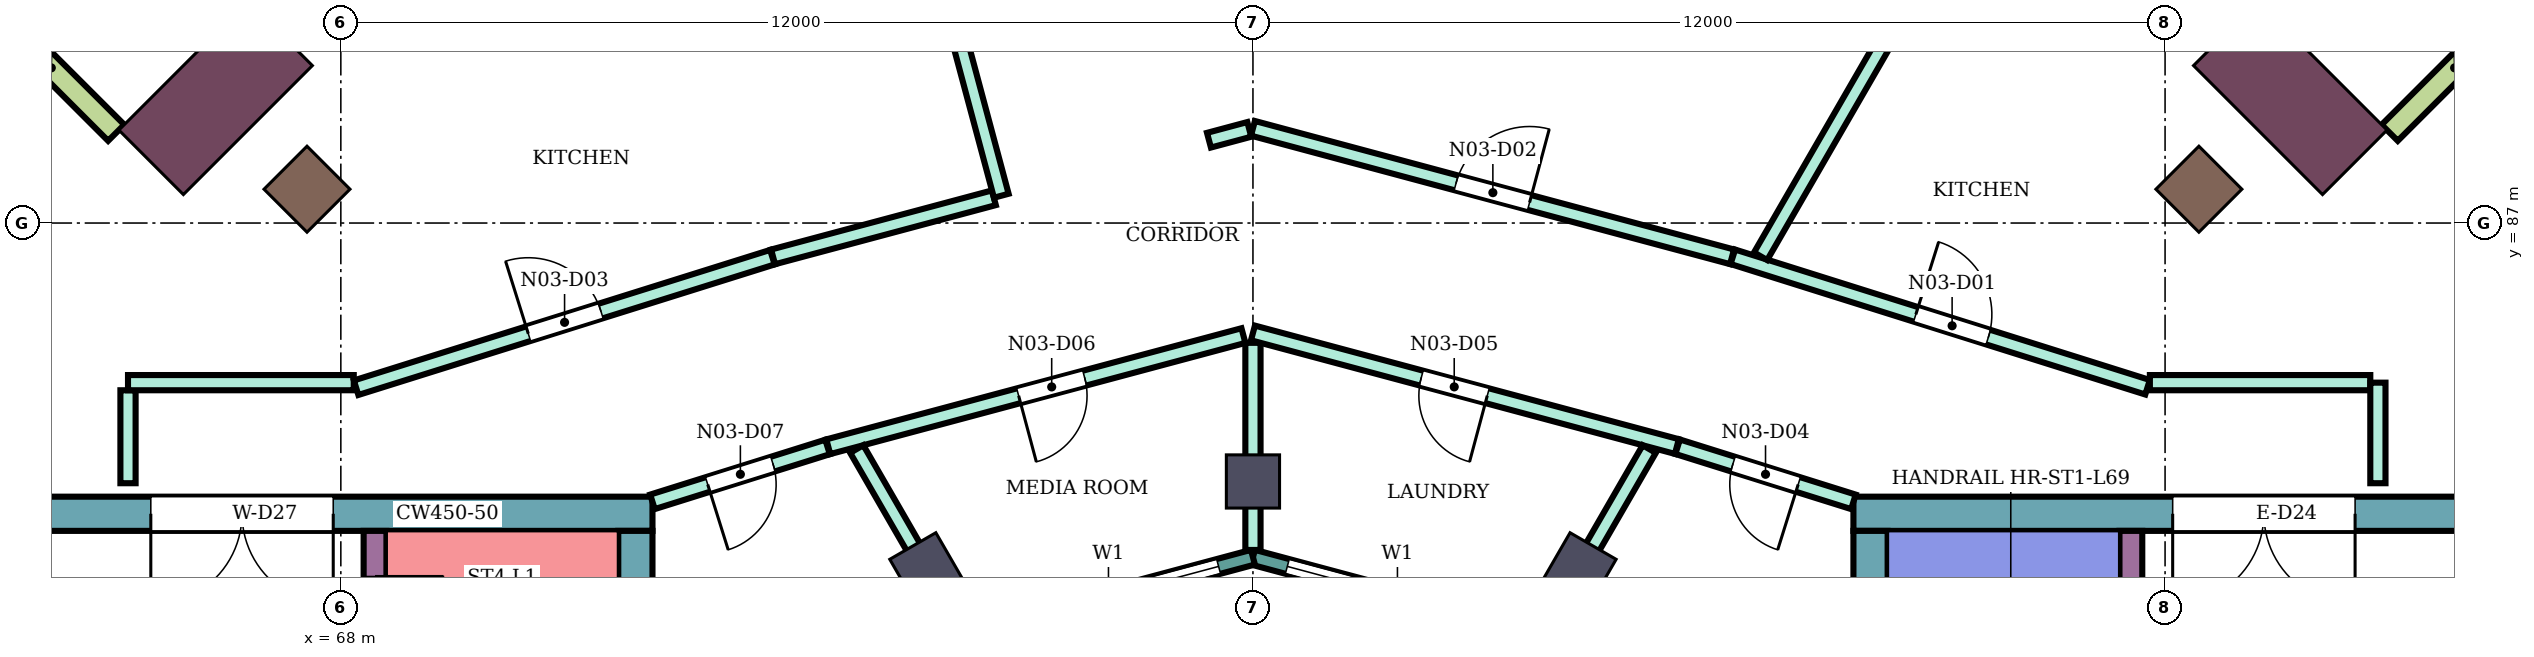
"""IFC4 building model, lengths in metres.
Left out: names, types, materials, properties, quantities, classifications, styles, units other than length and angle.
Written with IfcOpenShell. Run it as: python <this file> out.ifc"""

import sys

from ifc_helpers import new_model, si_unit, direction, frame, frame_2d, origin, origin_2d, place, context, subcontext, project, spatial, rectangle, extrude, element, fill, save


model = new_model("IFC4")
c1 = context("Model", 3, precision=1e-05, world=origin(), true_north=direction((0.0, 1.0)))
c2 = subcontext(c1, "Body", "Model", "MODEL_VIEW")
j1 = project(units=[si_unit("LENGTHUNIT", "METRE"), si_unit("PLANEANGLEUNIT", "RADIAN")], contexts=[c1])
p1 = place(None, origin())
s1 = spatial("IfcSite", under=j1, at=p1, CompositionType="ELEMENT")
p2 = place(p1, origin())
s2 = spatial("IfcBuilding", under=s1, at=p2, CompositionType="ELEMENT")
p3 = place(p2, frame((0.0, 0.0, 300.9)))
s3 = spatial("IfcBuildingStorey", under=s2, at=p3, CompositionType="ELEMENT", Elevation=300.9)
for number, where, z_axis, x_axis in (
    (1, (92.445, 87.445, 0.0), (0.0, 0.0, 1.0), (0.707, 0.707, 0.0)),
    (2, (67.555, 87.445, 0.0), (0.0, 0.0, 1.0), (-0.707, 0.707, 0.0)),
):
    element("IfcColumn", number, at=place(p3, frame(where, z_axis=z_axis, x_axis=x_axis)), inside=s3, PredefinedType="COLUMN", context=c2, shape_type="SweptSolid", body=[
        extrude(rectangle(XDim=0.8, YDim=0.8, at=origin_2d()), origin(), (0.0, 0.0, 1.0), 4.2),
    ])
for number, where, z_axis, x_axis in (
    (3, (84.3, 82.448, 0.0), (0.0, 0.0, 1.0), (0.5, 0.866, 0.0)),
    (4, (80.0, 83.6, 0.0), (0.0, 0.0, 1.0), (0.0, 1.0, 0.0)),
    (5, (75.7, 82.448, 0.0), (0.0, 0.0, 1.0), (-0.5, 0.866, 0.0)),
):
    element("IfcColumn", number, at=place(p3, frame(where, z_axis=z_axis, x_axis=x_axis)), inside=s3, PredefinedType="COLUMN", context=c2, shape_type="SweptSolid", body=[
        extrude(rectangle(XDim=0.7, YDim=0.7, at=origin_2d()), origin(), (0.0, 0.0, 1.0), 4.2),
    ])
for number, where, z_axis, x_axis in (
    (6, (93.647, 88.647, 0.0), (0.0, 0.0, 1.0), (0.707, 0.707, 0.0)),
    (7, (66.353, 88.647, 0.0), (0.0, 0.0, 1.0), (-0.707, 0.707, 0.0)),
):
    element("IfcColumn", number, at=place(p3, frame(where, z_axis=z_axis, x_axis=x_axis)), inside=s3, PredefinedType="COLUMN", context=c2, shape_type="SweptSolid", body=[
        extrude(rectangle(XDim=1.2, YDim=2.4, at=origin_2d()), origin(), (0.0, 0.0, 1.0), 4.2),
    ])
p4 = place(p3, frame((87.9, 83.175, 0.0), z_axis=(0.0, 0.0, 1.0), x_axis=(1.0, 0.0, 0.0)))
e8 = element("IfcWall", 8, at=p4, inside=s3, PredefinedType="SHEAR", context=c2, shape_type="SweptSolid", body=[
    extrude(rectangle(XDim=12.0, YDim=0.45, at=frame_2d((6.0, 0.0))), origin(), (0.0, 0.0, 1.0), 3.88),
])
p5 = place(p4, frame((4.2, 0.0, 0.0)))
e9 = element("IfcOpeningElement", 9, at=p5, cuts=e8, PredefinedType="OPENING", context=c2, shape_type="SweptSolid", body=[
    extrude(rectangle(XDim=2.4, YDim=2.4, at=frame_2d((1.2, 1.2))), frame((0.0, 0.235, 0.0), z_axis=(0.0, -1.0, 0.0), x_axis=(1.0, 0.0, 0.0)), (0.0, 0.0, 1.0), 0.47),
])
p6 = place(p3, frame((88.125, 75.0, 0.0), z_axis=(0.0, 0.0, 1.0), x_axis=(0.0, 1.0, 0.0)))
e10 = element("IfcWall", 10, at=p6, inside=s3, PredefinedType="SHEAR", context=c2, shape_type="SweptSolid", body=[
    extrude(rectangle(XDim=7.95, YDim=0.45, at=frame_2d((3.975, 0.0))), origin(), (0.0, 0.0, 1.0), 3.88),
])
p7 = place(p3, frame((91.55, 75.0, 0.0), z_axis=(0.0, 0.0, 1.0), x_axis=(0.0, 1.0, 0.0)))
e11 = element("IfcWall", 11, at=p7, inside=s3, PredefinedType="SHEAR", context=c2, shape_type="SweptSolid", body=[
    extrude(rectangle(XDim=7.95, YDim=0.3, at=frame_2d((3.975, 0.0))), origin(), (0.0, 0.0, 1.0), 3.88),
])
p8 = place(p7, frame((1.85, 0.0, 0.0)))
e12 = element("IfcOpeningElement", 12, at=p8, cuts=e11, PredefinedType="OPENING", context=c2, shape_type="SweptSolid", body=[
    extrude(rectangle(XDim=0.9, YDim=2.1, at=frame_2d((0.45, 1.05))), frame((0.0, 0.16, 0.0), z_axis=(0.0, -1.0, 0.0), x_axis=(1.0, 0.0, 0.0)), (0.0, 0.0, 1.0), 0.32),
])
p9 = place(p3, frame((72.1, 83.175, 0.0), z_axis=(0.0, 0.0, 1.0), x_axis=(-1.0, 0.0, 0.0)))
e13 = element("IfcWall", 13, at=p9, inside=s3, PredefinedType="SHEAR", context=c2, shape_type="SweptSolid", body=[
    extrude(rectangle(XDim=12.0, YDim=0.45, at=frame_2d((6.0, 0.0))), origin(), (0.0, 0.0, 1.0), 3.88),
])
p10 = place(p9, frame((4.2, 0.0, 0.0)))
e14 = element("IfcOpeningElement", 14, at=p10, cuts=e13, PredefinedType="OPENING", context=c2, shape_type="SweptSolid", body=[
    extrude(rectangle(XDim=2.4, YDim=2.4, at=frame_2d((1.2, 1.2))), frame((0.0, 0.235, 0.0), z_axis=(0.0, -1.0, 0.0), x_axis=(1.0, 0.0, 0.0)), (0.0, 0.0, 1.0), 0.47),
])
p11 = place(p3, frame((71.875, 82.95, 0.0), z_axis=(0.0, 0.0, 1.0), x_axis=(0.0, -1.0, 0.0)))
e15 = element("IfcWall", 15, at=p11, inside=s3, PredefinedType="SHEAR", context=c2, shape_type="SweptSolid", body=[
    extrude(rectangle(XDim=7.95, YDim=0.45, at=frame_2d((3.975, 0.0))), origin(), (0.0, 0.0, 1.0), 3.88),
])
p12 = place(p3, frame((68.45, 82.95, 0.0), z_axis=(0.0, 0.0, 1.0), x_axis=(0.0, -1.0, 0.0)))
e16 = element("IfcWall", 16, at=p12, inside=s3, PredefinedType="SHEAR", context=c2, shape_type="SweptSolid", body=[
    extrude(rectangle(XDim=7.95, YDim=0.3, at=frame_2d((3.975, 0.0))), origin(), (0.0, 0.0, 1.0), 3.88),
])
p13 = place(p12, frame((0.6, 0.0, 0.0)))
e17 = element("IfcOpeningElement", 17, at=p13, cuts=e16, PredefinedType="OPENING", context=c2, shape_type="SweptSolid", body=[
    extrude(rectangle(XDim=0.9, YDim=2.1, at=frame_2d((0.45, 1.05))), frame((0.0, 0.16, 0.0), z_axis=(0.0, -1.0, 0.0), x_axis=(1.0, 0.0, 0.0)), (0.0, 0.0, 1.0), 0.32),
])
for number, where, z_axis, x_axis in (
    (18, (94.955, 88.188, 0.0), (0.0, 0.0, 1.0), (0.707, 0.707, 0.0)),
    (19, (65.045, 88.188, 0.0), (0.0, 0.0, 1.0), (-0.707, 0.707, 0.0)),
):
    element("IfcWall", number, at=place(p3, frame(where, z_axis=z_axis, x_axis=x_axis)), inside=s3, PredefinedType="NOTDEFINED", context=c2, shape_type="SweptSolid", body=[
        extrude(rectangle(XDim=2.416, YDim=0.3, at=frame_2d((1.208, 0.0))), origin(), (0.0, 0.0, 1.0), 4.2),
    ])
p14 = place(p3, frame((83.802, 81.585, 0.0), z_axis=(0.0, 0.0, 1.0), x_axis=(-0.965933654434, 0.258789828301, 0.0)))
e20 = element("IfcWall", 20, at=p14, inside=s3, PredefinedType="NOTDEFINED", context=c2, shape_type="SweptSolid", body=[
    extrude(rectangle(XDim=3.936, YDim=0.2, at=frame_2d((1.968, 0.0))), origin(), (0.0, 0.0, 1.0), 4.2),
])
p15 = place(p14, frame((0.468, 0.0, 0.9)))
e21 = element("IfcOpeningElement", 21, at=p15, cuts=e20, PredefinedType="OPENING", context=c2, shape_type="SweptSolid", body=[
    extrude(rectangle(XDim=3.0, YDim=2.3, at=frame_2d((1.5, 1.15))), frame((0.0, 0.11, 0.0), z_axis=(0.0, -1.0, 0.0), x_axis=(1.0, 0.0, 0.0)), (0.0, 0.0, 1.0), 0.22),
])
p16 = place(p3, frame((80.0, 82.604, 0.0), z_axis=(0.0, 0.0, 1.0), x_axis=(-0.965933654434, -0.258789828301, 0.0)))
e22 = element("IfcWall", 22, at=p16, inside=s3, PredefinedType="NOTDEFINED", context=c2, shape_type="SweptSolid", body=[
    extrude(rectangle(XDim=3.936, YDim=0.2, at=frame_2d((1.968, 0.0))), origin(), (0.0, 0.0, 1.0), 4.2),
])
p17 = place(p16, frame((0.468, 0.0, 0.9)))
e23 = element("IfcOpeningElement", 23, at=p17, cuts=e22, PredefinedType="OPENING", context=c2, shape_type="SweptSolid", body=[
    extrude(rectangle(XDim=3.0, YDim=2.3, at=frame_2d((1.5, 1.15))), frame((0.0, 0.11, 0.0), z_axis=(0.0, -1.0, 0.0), x_axis=(1.0, 0.0, 0.0)), (0.0, 0.0, 1.0), 0.22),
])
p18 = place(p3, frame((65.2, 83.577, 0.0), z_axis=(0.0, 0.0, 1.0), x_axis=(0.0, 1.0, 0.0)))
e24 = element("IfcWall", 24, at=p18, inside=s3, PredefinedType="PARTITIONING", context=c2, shape_type="SweptSolid", body=[
    extrude(rectangle(XDim=1.223, YDim=0.2, at=frame_2d((0.612, 0.0))), origin(), (0.0, 0.0, 1.0), 3.75),
])
p19 = place(p3, frame((65.2, 84.9, 0.0), z_axis=(0.0, 0.0, 1.0), x_axis=(1.0, 0.0, 0.0)))
e25 = element("IfcWall", 25, at=p19, inside=s3, PredefinedType="PARTITIONING", context=c2, shape_type="SweptSolid", body=[
    extrude(rectangle(XDim=2.97, YDim=0.2, at=frame_2d((1.485, 0.0))), origin(), (0.0, 0.0, 1.0), 3.75),
])
p20 = place(p3, frame((68.201, 84.833, 0.0), z_axis=(0.0, 0.0, 1.0), x_axis=(0.95420102455, 0.299166182492, 0.0)))
e26 = element("IfcWall", 26, at=p20, inside=s3, PredefinedType="PARTITIONING", context=c2, shape_type="SweptSolid", body=[
    extrude(rectangle(XDim=5.74, YDim=0.2, at=frame_2d((2.87, 0.0))), origin(), (0.0, 0.0, 1.0), 3.75),
])
p21 = place(p20, frame((2.374, 0.0, 0.0)))
e27 = element("IfcOpeningElement", 27, at=p21, cuts=e26, PredefinedType="OPENING", context=c2, shape_type="SweptSolid", body=[
    extrude(rectangle(XDim=1.0, YDim=2.1, at=frame_2d((0.5, 1.05))), frame((0.0, 0.11, 0.0), z_axis=(0.0, -1.0, 0.0), x_axis=(1.0, 0.0, 0.0)), (0.0, 0.0, 1.0), 0.22),
])
p22 = place(p3, frame((72.1, 83.332, 0.0), z_axis=(0.0, 0.0, 1.0), x_axis=(0.954233106619, 0.299063836383, 0.0)))
e28 = element("IfcWall", 28, at=p22, inside=s3, PredefinedType="PARTITIONING", context=c2, shape_type="SweptSolid", body=[
    extrude(rectangle(XDim=2.414, YDim=0.2, at=frame_2d((1.207, 0.0))), origin(), (0.0, 0.0, 1.0), 3.75),
])
p23 = place(p22, frame((0.762, 0.0, 0.0)))
e29 = element("IfcOpeningElement", 29, at=p23, cuts=e28, PredefinedType="OPENING", context=c2, shape_type="SweptSolid", body=[
    extrude(rectangle(XDim=0.9, YDim=2.1, at=frame_2d((0.45, 1.05))), frame((0.0, 0.11, 0.0), z_axis=(0.0, -1.0, 0.0), x_axis=(1.0, 0.0, 0.0)), (0.0, 0.0, 1.0), 0.22),
])
p24 = place(p3, frame((73.687, 86.555, 0.0), z_axis=(0.0, 0.0, 1.0), x_axis=(0.965987897826, 0.258587279759, 0.0)))
e30 = element("IfcWall", 30, at=p24, inside=s3, PredefinedType="PARTITIONING", context=c2, shape_type="SweptSolid", body=[
    extrude(rectangle(XDim=3.007, YDim=0.2, at=frame_2d((1.503, 0.0))), origin(), (0.0, 0.0, 1.0), 3.75),
])
p25 = place(p3, frame((74.23, 96.538, 0.0), z_axis=(0.0, 0.0, 1.0), x_axis=(0.258775468547, -0.965937501538, 0.0)))
e31 = element("IfcWall", 31, at=p25, inside=s3, PredefinedType="PARTITIONING", context=c2, shape_type="SweptSolid", body=[
    extrude(rectangle(XDim=9.502, YDim=0.2, at=frame_2d((4.751, 0.0))), origin(), (0.0, 0.0, 1.0), 3.75),
])
p26 = place(p3, frame((74.413, 84.057, 0.0), z_axis=(0.0, 0.0, 1.0), x_axis=(0.965972135939, 0.258646153246, 0.0)))
e32 = element("IfcWall", 32, at=p26, inside=s3, PredefinedType="PARTITIONING", context=c2, shape_type="SweptSolid", body=[
    extrude(rectangle(XDim=5.654, YDim=0.2, at=frame_2d((2.827, 0.0))), origin(), (0.0, 0.0, 1.0), 3.75),
])
p27 = place(p26, frame((2.593, 0.0, 0.0)))
e33 = element("IfcOpeningElement", 33, at=p27, cuts=e32, PredefinedType="OPENING", context=c2, shape_type="SweptSolid", body=[
    extrude(rectangle(XDim=0.9, YDim=2.1, at=frame_2d((0.45, 1.05))), frame((0.0, 0.11, 0.0), z_axis=(0.0, -1.0, 0.0), x_axis=(1.0, 0.0, 0.0)), (0.0, 0.0, 1.0), 0.22),
])
p28 = place(p3, frame((74.787, 84.027, 0.0), z_axis=(0.0, 0.0, 1.0), x_axis=(0.500079107518, -0.86597972622, 0.0)))
e34 = element("IfcWall", 34, at=p28, inside=s3, PredefinedType="PARTITIONING", context=c2, shape_type="SweptSolid", body=[
    extrude(rectangle(XDim=2.726, YDim=0.2, at=frame_2d((1.363, 0.0))), origin(), (0.0, 0.0, 1.0), 3.75),
])
p29 = place(p3, frame((79.421, 88.09, 0.0), z_axis=(0.0, 0.0, 1.0), x_axis=(0.966065016104, 0.258299021793, 0.0)))
e35 = element("IfcWall", 35, at=p29, inside=s3, PredefinedType="PARTITIONING", context=c2, shape_type="SweptSolid", body=[
    extrude(rectangle(XDim=0.549, YDim=0.2, at=frame_2d((0.274, 0.0))), origin(), (0.0, 0.0, 1.0), 3.75),
])
p30 = place(p3, frame((80.0, 82.699, 0.0), z_axis=(0.0, 0.0, 1.0), x_axis=(0.0, 1.0, 0.0)))
e36 = element("IfcWall", 36, at=p30, inside=s3, PredefinedType="PARTITIONING", context=c2, shape_type="SweptSolid", body=[
    extrude(rectangle(XDim=2.725, YDim=0.2, at=frame_2d((1.363, 0.0))), origin(), (0.0, 0.0, 1.0), 3.75),
])
p31 = place(p3, frame((80.0, 85.554, 0.0), z_axis=(0.0, 0.0, 1.0), x_axis=(0.965928989968, -0.258807237802, 0.0)))
e37 = element("IfcWall", 37, at=p31, inside=s3, PredefinedType="PARTITIONING", context=c2, shape_type="SweptSolid", body=[
    extrude(rectangle(XDim=5.774, YDim=0.2, at=frame_2d((2.887, 0.0))), origin(), (0.0, 0.0, 1.0), 3.75),
])
p32 = place(p31, frame((2.292, 0.0, 0.0)))
e38 = element("IfcOpeningElement", 38, at=p32, cuts=e37, PredefinedType="OPENING", context=c2, shape_type="SweptSolid", body=[
    extrude(rectangle(XDim=0.9, YDim=2.1, at=frame_2d((0.45, 1.05))), frame((0.0, 0.11, 0.0), z_axis=(0.0, -1.0, 0.0), x_axis=(1.0, 0.0, 0.0)), (0.0, 0.0, 1.0), 0.22),
])
p33 = place(p3, frame((80.0, 88.246, 0.0), z_axis=(0.0, 0.0, 1.0), x_axis=(0.965856994925, -0.259075790752, 0.0)))
e39 = element("IfcWall", 39, at=p33, inside=s3, PredefinedType="PARTITIONING", context=c2, shape_type="SweptSolid", body=[
    extrude(rectangle(XDim=6.526, YDim=0.2, at=frame_2d((3.263, 0.0))), origin(), (0.0, 0.0, 1.0), 3.75),
])
p34 = place(p33, frame((2.768, 0.0, 0.0)))
e40 = element("IfcOpeningElement", 40, at=p34, cuts=e39, PredefinedType="OPENING", context=c2, shape_type="SweptSolid", body=[
    extrude(rectangle(XDim=1.0, YDim=2.1, at=frame_2d((0.5, 1.05))), frame((0.0, 0.11, 0.0), z_axis=(0.0, -1.0, 0.0), x_axis=(1.0, 0.0, 0.0)), (0.0, 0.0, 1.0), 0.22),
])
p35 = place(p3, frame((83.851, 81.666, 0.0), z_axis=(0.0, 0.0, 1.0), x_axis=(0.500146274735, 0.865940935554, 0.0)))
e41 = element("IfcWall", 41, at=p35, inside=s3, PredefinedType="PARTITIONING", context=c2, shape_type="SweptSolid", body=[
    extrude(rectangle(XDim=2.726, YDim=0.2, at=frame_2d((1.363, 0.0))), origin(), (0.0, 0.0, 1.0), 3.75),
])
p36 = place(p3, frame((85.587, 84.057, 0.0), z_axis=(0.0, 0.0, 1.0), x_axis=(0.954239513179, -0.299043393987, 0.0)))
e42 = element("IfcWall", 42, at=p36, inside=s3, PredefinedType="PARTITIONING", context=c2, shape_type="SweptSolid", body=[
    extrude(rectangle(XDim=2.424, YDim=0.2, at=frame_2d((1.212, 0.0))), origin(), (0.0, 0.0, 1.0), 3.75),
])
p37 = place(p36, frame((0.762, 0.0, 0.0)))
e43 = element("IfcOpeningElement", 43, at=p37, cuts=e42, PredefinedType="OPENING", context=c2, shape_type="SweptSolid", body=[
    extrude(rectangle(XDim=0.9, YDim=2.1, at=frame_2d((0.45, 1.05))), frame((0.0, 0.11, 0.0), z_axis=(0.0, -1.0, 0.0), x_axis=(1.0, 0.0, 0.0)), (0.0, 0.0, 1.0), 0.22),
])
p38 = place(p3, frame((86.314, 86.556, 0.0), z_axis=(0.0, 0.0, 1.0), x_axis=(0.953912400139, -0.300085209334, 0.0)))
e44 = element("IfcWall", 44, at=p38, inside=s3, PredefinedType="PARTITIONING", context=c2, shape_type="SweptSolid", body=[
    extrude(rectangle(XDim=5.719, YDim=0.2, at=frame_2d((2.86, 0.0))), origin(), (0.0, 0.0, 1.0), 3.75),
])
p39 = place(p38, frame((2.524, 0.0, 0.0)))
e45 = element("IfcOpeningElement", 45, at=p39, cuts=e44, PredefinedType="OPENING", context=c2, shape_type="SweptSolid", body=[
    extrude(rectangle(XDim=1.0, YDim=2.1, at=frame_2d((0.5, 1.05))), frame((0.0, 0.11, 0.0), z_axis=(0.0, -1.0, 0.0), x_axis=(1.0, 0.0, 0.0)), (0.0, 0.0, 1.0), 0.22),
])
p40 = place(p3, frame((86.679, 86.563, 0.0), z_axis=(0.0, 0.0, 1.0), x_axis=(0.500152516677, 0.865937330331, 0.0)))
e46 = element("IfcWall", 46, at=p40, inside=s3, PredefinedType="PARTITIONING", context=c2, shape_type="SweptSolid", body=[
    extrude(rectangle(XDim=8.943, YDim=0.2, at=frame_2d((4.472, 0.0))), origin(), (0.0, 0.0, 1.0), 3.75),
])
p41 = place(p3, frame((91.8, 84.9, 0.0), z_axis=(0.0, 0.0, 1.0), x_axis=(1.0, 0.0, 0.0)))
e47 = element("IfcWall", 47, at=p41, inside=s3, PredefinedType="PARTITIONING", context=c2, shape_type="SweptSolid", body=[
    extrude(rectangle(XDim=2.9, YDim=0.2, at=frame_2d((1.45, 0.0))), origin(), (0.0, 0.0, 1.0), 3.75),
])
p42 = place(p3, frame((94.8, 83.577, 0.0), z_axis=(0.0, 0.0, 1.0), x_axis=(0.0, 1.0, 0.0)))
e48 = element("IfcWall", 48, at=p42, inside=s3, PredefinedType="PARTITIONING", context=c2, shape_type="SweptSolid", body=[
    extrude(rectangle(XDim=1.323, YDim=0.2, at=frame_2d((0.662, 0.0))), origin(), (0.0, 0.0, 1.0), 3.75),
])
p43 = place(p15, origin())
e49 = element("IfcWindow", 49, at=p43, inside=s3, PartitioningType="SINGLE_PANEL", PredefinedType="WINDOW", context=c2, shape_type="SweptSolid", body=[
    extrude(rectangle(XDim=3.0, YDim=2.3, at=frame_2d((1.5, 1.15))), frame((0.0, 0.03, 0.0), z_axis=(0.0, -1.0, 0.0), x_axis=(1.0, 0.0, 0.0)), (0.0, 0.0, 1.0), 0.06),
])
fill(e21, e49)
p44 = place(p17, origin())
e50 = element("IfcWindow", 50, at=p44, inside=s3, PartitioningType="SINGLE_PANEL", PredefinedType="WINDOW", context=c2, shape_type="SweptSolid", body=[
    extrude(rectangle(XDim=3.0, YDim=2.3, at=frame_2d((1.5, 1.15))), frame((0.0, 0.03, 0.0), z_axis=(0.0, -1.0, 0.0), x_axis=(1.0, 0.0, 0.0)), (0.0, 0.0, 1.0), 0.06),
])
fill(e23, e50)
p45 = place(p39, origin())
e51 = element("IfcDoor", 51, at=p45, inside=s3, OperationType="SINGLE_SWING_LEFT", PredefinedType="DOOR", context=c2, shape_type="SweptSolid", body=[
    extrude(rectangle(XDim=1.0, YDim=2.1, at=frame_2d((0.5, 1.05))), frame((0.0, 0.025, 0.0), z_axis=(0.0, -1.0, 0.0), x_axis=(1.0, 0.0, 0.0)), (0.0, 0.0, 1.0), 0.05),
])
fill(e45, e51)
p46 = place(p34, origin())
e52 = element("IfcDoor", 52, at=p46, inside=s3, OperationType="SINGLE_SWING_RIGHT", PredefinedType="DOOR", context=c2, shape_type="SweptSolid", body=[
    extrude(rectangle(XDim=1.0, YDim=2.1, at=frame_2d((0.5, 1.05))), frame((0.0, 0.025, 0.0), z_axis=(0.0, -1.0, 0.0), x_axis=(1.0, 0.0, 0.0)), (0.0, 0.0, 1.0), 0.05),
])
fill(e40, e52)
p47 = place(p21, origin())
e53 = element("IfcDoor", 53, at=p47, inside=s3, OperationType="SINGLE_SWING_LEFT", PredefinedType="DOOR", context=c2, shape_type="SweptSolid", body=[
    extrude(rectangle(XDim=1.0, YDim=2.1, at=frame_2d((0.5, 1.05))), frame((0.0, 0.025, 0.0), z_axis=(0.0, -1.0, 0.0), x_axis=(1.0, 0.0, 0.0)), (0.0, 0.0, 1.0), 0.05),
])
fill(e27, e53)
p48 = place(p37, frame((0.9, 0.0, 0.0), z_axis=(0.0, 0.0, 1.0), x_axis=(-1.0, 0.0, 0.0)))
e54 = element("IfcDoor", 54, at=p48, inside=s3, OperationType="SINGLE_SWING_LEFT", PredefinedType="DOOR", context=c2, shape_type="SweptSolid", body=[
    extrude(rectangle(XDim=0.9, YDim=2.1, at=frame_2d((0.45, 1.05))), frame((0.0, 0.025, 0.0), z_axis=(0.0, -1.0, 0.0), x_axis=(1.0, 0.0, 0.0)), (0.0, 0.0, 1.0), 0.05),
])
fill(e43, e54)
p49 = place(p32, frame((0.9, 0.0, 0.0), z_axis=(0.0, 0.0, 1.0), x_axis=(-1.0, 0.0, 0.0)))
e55 = element("IfcDoor", 55, at=p49, inside=s3, OperationType="SINGLE_SWING_LEFT", PredefinedType="DOOR", context=c2, shape_type="SweptSolid", body=[
    extrude(rectangle(XDim=0.9, YDim=2.1, at=frame_2d((0.45, 1.05))), frame((0.0, 0.025, 0.0), z_axis=(0.0, -1.0, 0.0), x_axis=(1.0, 0.0, 0.0)), (0.0, 0.0, 1.0), 0.05),
])
fill(e38, e55)
p50 = place(p27, frame((0.9, 0.0, 0.0), z_axis=(0.0, 0.0, 1.0), x_axis=(-1.0, 0.0, 0.0)))
e56 = element("IfcDoor", 56, at=p50, inside=s3, OperationType="SINGLE_SWING_RIGHT", PredefinedType="DOOR", context=c2, shape_type="SweptSolid", body=[
    extrude(rectangle(XDim=0.9, YDim=2.1, at=frame_2d((0.45, 1.05))), frame((0.0, 0.025, 0.0), z_axis=(0.0, -1.0, 0.0), x_axis=(1.0, 0.0, 0.0)), (0.0, 0.0, 1.0), 0.05),
])
fill(e33, e56)
p51 = place(p23, frame((0.9, 0.0, 0.0), z_axis=(0.0, 0.0, 1.0), x_axis=(-1.0, 0.0, 0.0)))
e57 = element("IfcDoor", 57, at=p51, inside=s3, OperationType="SINGLE_SWING_RIGHT", PredefinedType="DOOR", context=c2, shape_type="SweptSolid", body=[
    extrude(rectangle(XDim=0.9, YDim=2.1, at=frame_2d((0.45, 1.05))), frame((0.0, 0.025, 0.0), z_axis=(0.0, -1.0, 0.0), x_axis=(1.0, 0.0, 0.0)), (0.0, 0.0, 1.0), 0.05),
])
fill(e29, e57)
p52 = place(p5, frame((2.4, 0.0, 0.0), z_axis=(0.0, 0.0, 1.0), x_axis=(-1.0, 0.0, 0.0)))
e58 = element("IfcDoor", 58, at=p52, inside=s3, OperationType="DOUBLE_DOOR_SINGLE_SWING", PredefinedType="DOOR", context=c2, shape_type="SweptSolid", body=[
    extrude(rectangle(XDim=2.4, YDim=2.4, at=frame_2d((1.2, 1.2))), frame((0.0, 0.025, 0.0), z_axis=(0.0, -1.0, 0.0), x_axis=(1.0, 0.0, 0.0)), (0.0, 0.0, 1.0), 0.05),
])
fill(e9, e58)
p53 = place(p13, origin())
e59 = element("IfcDoor", 59, at=p53, inside=s3, OperationType="SINGLE_SWING_LEFT", PredefinedType="DOOR", context=c2, shape_type="SweptSolid", body=[
    extrude(rectangle(XDim=0.9, YDim=2.1, at=frame_2d((0.45, 1.05))), frame((0.0, 0.025, 0.0), z_axis=(0.0, -1.0, 0.0), x_axis=(1.0, 0.0, 0.0)), (0.0, 0.0, 1.0), 0.05),
])
fill(e17, e59)
p54 = place(p10, origin())
e60 = element("IfcDoor", 60, at=p54, inside=s3, OperationType="DOUBLE_DOOR_SINGLE_SWING", PredefinedType="DOOR", context=c2, shape_type="SweptSolid", body=[
    extrude(rectangle(XDim=2.4, YDim=2.4, at=frame_2d((1.2, 1.2))), frame((0.0, 0.025, 0.0), z_axis=(0.0, -1.0, 0.0), x_axis=(1.0, 0.0, 0.0)), (0.0, 0.0, 1.0), 0.05),
])
fill(e14, e60)
save(model, sys.argv[1])
